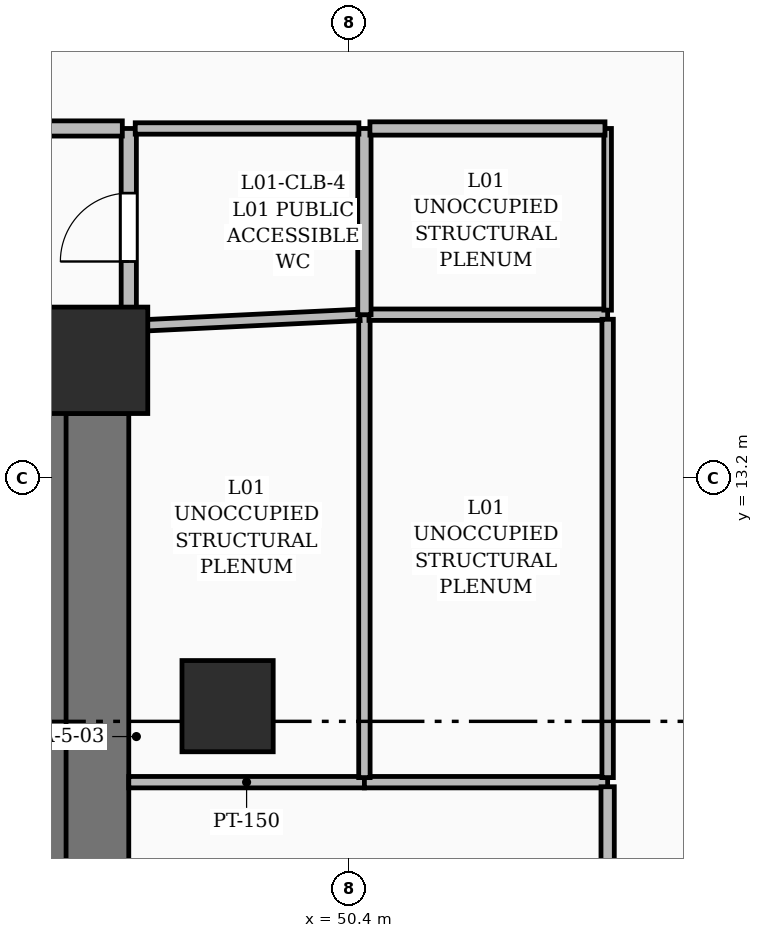
"""IFC4 building model, lengths in metres.
Left out: names, types, materials, properties, quantities, classifications, styles, units other than length and angle.
Written with IfcOpenShell. Run it as: python <this file> out.ifc"""

import sys

from ifc_helpers import new_model, si_unit, direction, frame, frame_2d, origin, origin_2d, place, context, subcontext, project, spatial, rectangle, extrude, element, fill, save


model = new_model("IFC4")
c1 = context("Model", 3, precision=1e-05, world=origin(), true_north=direction((0.0, 1.0)))
c2 = subcontext(c1, "Body", "Model", "MODEL_VIEW")
j1 = project(units=[si_unit("LENGTHUNIT", "METRE"), si_unit("PLANEANGLEUNIT", "RADIAN")], contexts=[c1])
p1 = place(None, origin())
s1 = spatial("IfcSite", under=j1, at=p1, CompositionType="ELEMENT")
p2 = place(p1, origin())
s2 = spatial("IfcBuilding", under=s1, at=p2, CompositionType="ELEMENT")
p3 = place(p2, frame((0.0, 0.0, 8.4)))
s3 = spatial("IfcBuildingStorey", under=s2, at=p3, CompositionType="ELEMENT", Elevation=8.4)
p4 = place(p3, frame((47.05, 14.75, 0.0), z_axis=(0.0, 0.0, 1.0), x_axis=(1.0, 0.0, 0.0)))
e1 = element("IfcColumn", 1, at=p4, inside=s3, PredefinedType="COLUMN", context=c2, shape_type="SweptSolid", body=[
    extrude(rectangle(XDim=1.4, YDim=1.4, at=origin_2d()), origin(), (0.0, 0.0, 1.0), 4.5),
])
p5 = place(p3, frame((48.8, 10.2, 0.0), z_axis=(0.0, 0.0, 1.0), x_axis=(1.0, 0.0, 0.0)))
e2 = element("IfcColumn", 2, at=p5, inside=s3, PredefinedType="COLUMN", context=c2, shape_type="SweptSolid", body=[
    extrude(rectangle(XDim=1.2, YDim=1.2, at=origin_2d()), origin(), (0.0, 0.0, 1.0), 4.5),
])
p6 = place(p3, frame((47.05, 5.25, 0.0), z_axis=(0.0, 0.0, 1.0), x_axis=(0.0, 1.0, 0.0)))
e3 = element("IfcWall", 3, at=p6, inside=s3, PredefinedType="SHEAR", context=c2, shape_type="SweptSolid", body=[
    extrude(rectangle(XDim=8.8, YDim=0.9, at=frame_2d((4.4, 0.0))), origin(), (0.0, 0.0, 1.0), 4.5),
])
p7 = place(p3, frame((46.5, 5.2, 0.0), z_axis=(0.0, 0.0, 1.0), x_axis=(0.0, 1.0, 0.0)))
e4 = element("IfcWall", 4, at=p7, inside=s3, PredefinedType="SOLIDWALL", context=c2, shape_type="SweptSolid", body=[
    extrude(rectangle(XDim=9.1, YDim=0.35, at=frame_2d((4.55, 0.0))), origin(), (0.0, 0.0, 1.0), 4.5),
])
p8 = place(p3, frame((47.5, 15.2, 0.0), z_axis=(0.0, 0.0, 1.0), x_axis=(0.0, 1.0, 0.0)))
e5 = element("IfcWall", 5, at=p8, inside=s3, PredefinedType="PARTITIONING", context=c2, shape_type="SweptSolid", body=[
    extrude(rectangle(XDim=2.6, YDim=0.2, at=frame_2d((1.3, 0.0))), origin(), (0.0, 0.0, 1.0), 3.078),
])
p9 = place(p8, frame((0.85, 0.0, 0.0)))
e6 = element("IfcOpeningElement", 6, at=p9, cuts=e5, PredefinedType="OPENING", context=c2, shape_type="SweptSolid", body=[
    extrude(rectangle(XDim=0.9, YDim=2.1, at=frame_2d((0.45, 1.05))), frame((0.0, 0.11, 0.0), z_axis=(0.0, -1.0, 0.0), x_axis=(1.0, 0.0, 0.0)), (0.0, 0.0, 1.0), 0.22),
])
p10 = place(p3, frame((47.415, 17.8, 0.0), z_axis=(0.0, 0.0, 1.0), x_axis=(-1.0, 0.0, 0.0)))
e7 = element("IfcWall", 7, at=p10, inside=s3, PredefinedType="PARTITIONING", context=c2, shape_type="SweptSolid", body=[
    extrude(rectangle(XDim=2.415, YDim=0.2, at=frame_2d((1.208, 0.0))), origin(), (0.0, 0.0, 1.0), 3.159),
])
p11 = place(p3, frame((50.6, 9.2, 0.0), z_axis=(0.0, 0.0, 1.0), x_axis=(-1.0, 0.0, 0.0)))
e8 = element("IfcWall", 8, at=p11, inside=s3, PredefinedType="PARTITIONING", context=c2, shape_type="SweptSolid", body=[
    extrude(rectangle(XDim=3.1, YDim=0.15, at=frame_2d((1.55, 0.0))), origin(), (0.0, 0.0, 1.0), 3.159),
])
p12 = place(p3, frame((53.8, 9.2, 0.0), z_axis=(0.0, 0.0, 1.0), x_axis=(-1.0, 0.0, 0.0)))
e9 = element("IfcWall", 9, at=p12, inside=s3, PredefinedType="PARTITIONING", context=c2, shape_type="SweptSolid", body=[
    extrude(rectangle(XDim=3.2, YDim=0.15, at=frame_2d((1.6, 0.0))), origin(), (0.0, 0.0, 1.0), 3.621),
])
p13 = place(p3, frame((53.8, 1.9, 0.0), z_axis=(0.0, 0.0, 1.0), x_axis=(0.0, 1.0, 0.0)))
e10 = element("IfcWall", 10, at=p13, inside=s3, PredefinedType="PARTITIONING", context=c2, shape_type="SweptSolid", body=[
    extrude(rectangle(XDim=7.24, YDim=0.175, at=frame_2d((3.62, 0.0))), origin(), (0.0, 0.0, 1.0), 2.97),
])
p14 = place(p3, frame((50.6, 9.26, 0.0), z_axis=(0.0, 0.0, 1.0), x_axis=(0.0, 1.0, 0.0)))
e11 = element("IfcWall", 11, at=p14, inside=s3, PredefinedType="PARTITIONING", context=c2, shape_type="SweptSolid", body=[
    extrude(rectangle(XDim=6.09, YDim=0.15, at=frame_2d((3.045, 0.0))), origin(), (0.0, 0.0, 1.0), 3.078),
])
p15 = place(p3, frame((50.54, 15.347, 0.0), z_axis=(0.0, 0.0, 1.0), x_axis=(-0.998830110694, -0.048357108796, 0.0)))
e12 = element("IfcWall", 12, at=p15, inside=s3, PredefinedType="PARTITIONING", context=c2, shape_type="SweptSolid", body=[
    extrude(rectangle(XDim=2.958, YDim=0.15, at=frame_2d((1.479, 0.0))), origin(), (0.0, 0.0, 1.0), 3.078),
])
p16 = place(p3, frame((53.8, 15.35, 0.0), z_axis=(0.0, 0.0, 1.0), x_axis=(-1.0, 0.0, 0.0)))
e13 = element("IfcWall", 13, at=p16, inside=s3, PredefinedType="PARTITIONING", context=c2, shape_type="SweptSolid", body=[
    extrude(rectangle(XDim=3.14, YDim=0.15, at=frame_2d((1.57, 0.0))), origin(), (0.0, 0.0, 1.0), 3.621),
])
p17 = place(p3, frame((53.8, 9.26, 0.0), z_axis=(0.0, 0.0, 1.0), x_axis=(0.0, 1.0, 0.0)))
e14 = element("IfcWall", 14, at=p17, inside=s3, PredefinedType="PARTITIONING", context=c2, shape_type="SweptSolid", body=[
    extrude(rectangle(XDim=6.03, YDim=0.15, at=frame_2d((3.015, 0.0))), origin(), (0.0, 0.0, 1.0), 3.078),
])
p18 = place(p3, frame((50.6, 15.35, 0.0), z_axis=(0.0, 0.0, 1.0), x_axis=(0.0, 1.0, 0.0)))
e15 = element("IfcWall", 15, at=p18, inside=s3, PredefinedType="PARTITIONING", context=c2, shape_type="SweptSolid", body=[
    extrude(rectangle(XDim=2.45, YDim=0.175, at=frame_2d((1.225, 0.0))), origin(), (0.0, 0.0, 1.0), 4.2),
])
p19 = place(p3, frame((50.528, 17.8, 0.0), z_axis=(0.0, 0.0, 1.0), x_axis=(-1.0, 0.0, 0.0)))
e16 = element("IfcWall", 16, at=p19, inside=s3, PredefinedType="PARTITIONING", context=c2, shape_type="SweptSolid", body=[
    extrude(rectangle(XDim=2.943, YDim=0.15, at=frame_2d((1.471, 0.0))), origin(), (0.0, 0.0, 1.0), 3.078),
])
p20 = place(p3, frame((53.8, 15.41, 0.0), z_axis=(0.0, 0.0, 1.0), x_axis=(0.0, 1.0, 0.0)))
e17 = element("IfcWall", 17, at=p20, inside=s3, PredefinedType="PARTITIONING", context=c2, shape_type="SweptSolid", body=[
    extrude(rectangle(XDim=2.39, YDim=0.1, at=frame_2d((1.195, 0.0))), origin(), (0.0, 0.0, 1.0), 3.621),
])
p21 = place(p3, frame((53.765, 17.8, 0.0), z_axis=(0.0, 0.0, 1.0), x_axis=(-1.0, 0.0, 0.0)))
e18 = element("IfcWall", 18, at=p21, inside=s3, PredefinedType="PARTITIONING", context=c2, shape_type="SweptSolid", body=[
    extrude(rectangle(XDim=3.092, YDim=0.175, at=frame_2d((1.546, 0.0))), origin(), (0.0, 0.0, 1.0), 3.621),
])
p22 = place(p9, origin())
e19 = element("IfcDoor", 19, at=p22, inside=s3, OperationType="SINGLE_SWING_LEFT", PredefinedType="DOOR", context=c2, shape_type="SweptSolid", body=[
    extrude(rectangle(XDim=0.9, YDim=2.1, at=frame_2d((0.45, 1.05))), frame((0.0, 0.025, 0.0), z_axis=(0.0, -1.0, 0.0), x_axis=(1.0, 0.0, 0.0)), (0.0, 0.0, 1.0), 0.05),
])
fill(e6, e19)
save(model, sys.argv[1])
